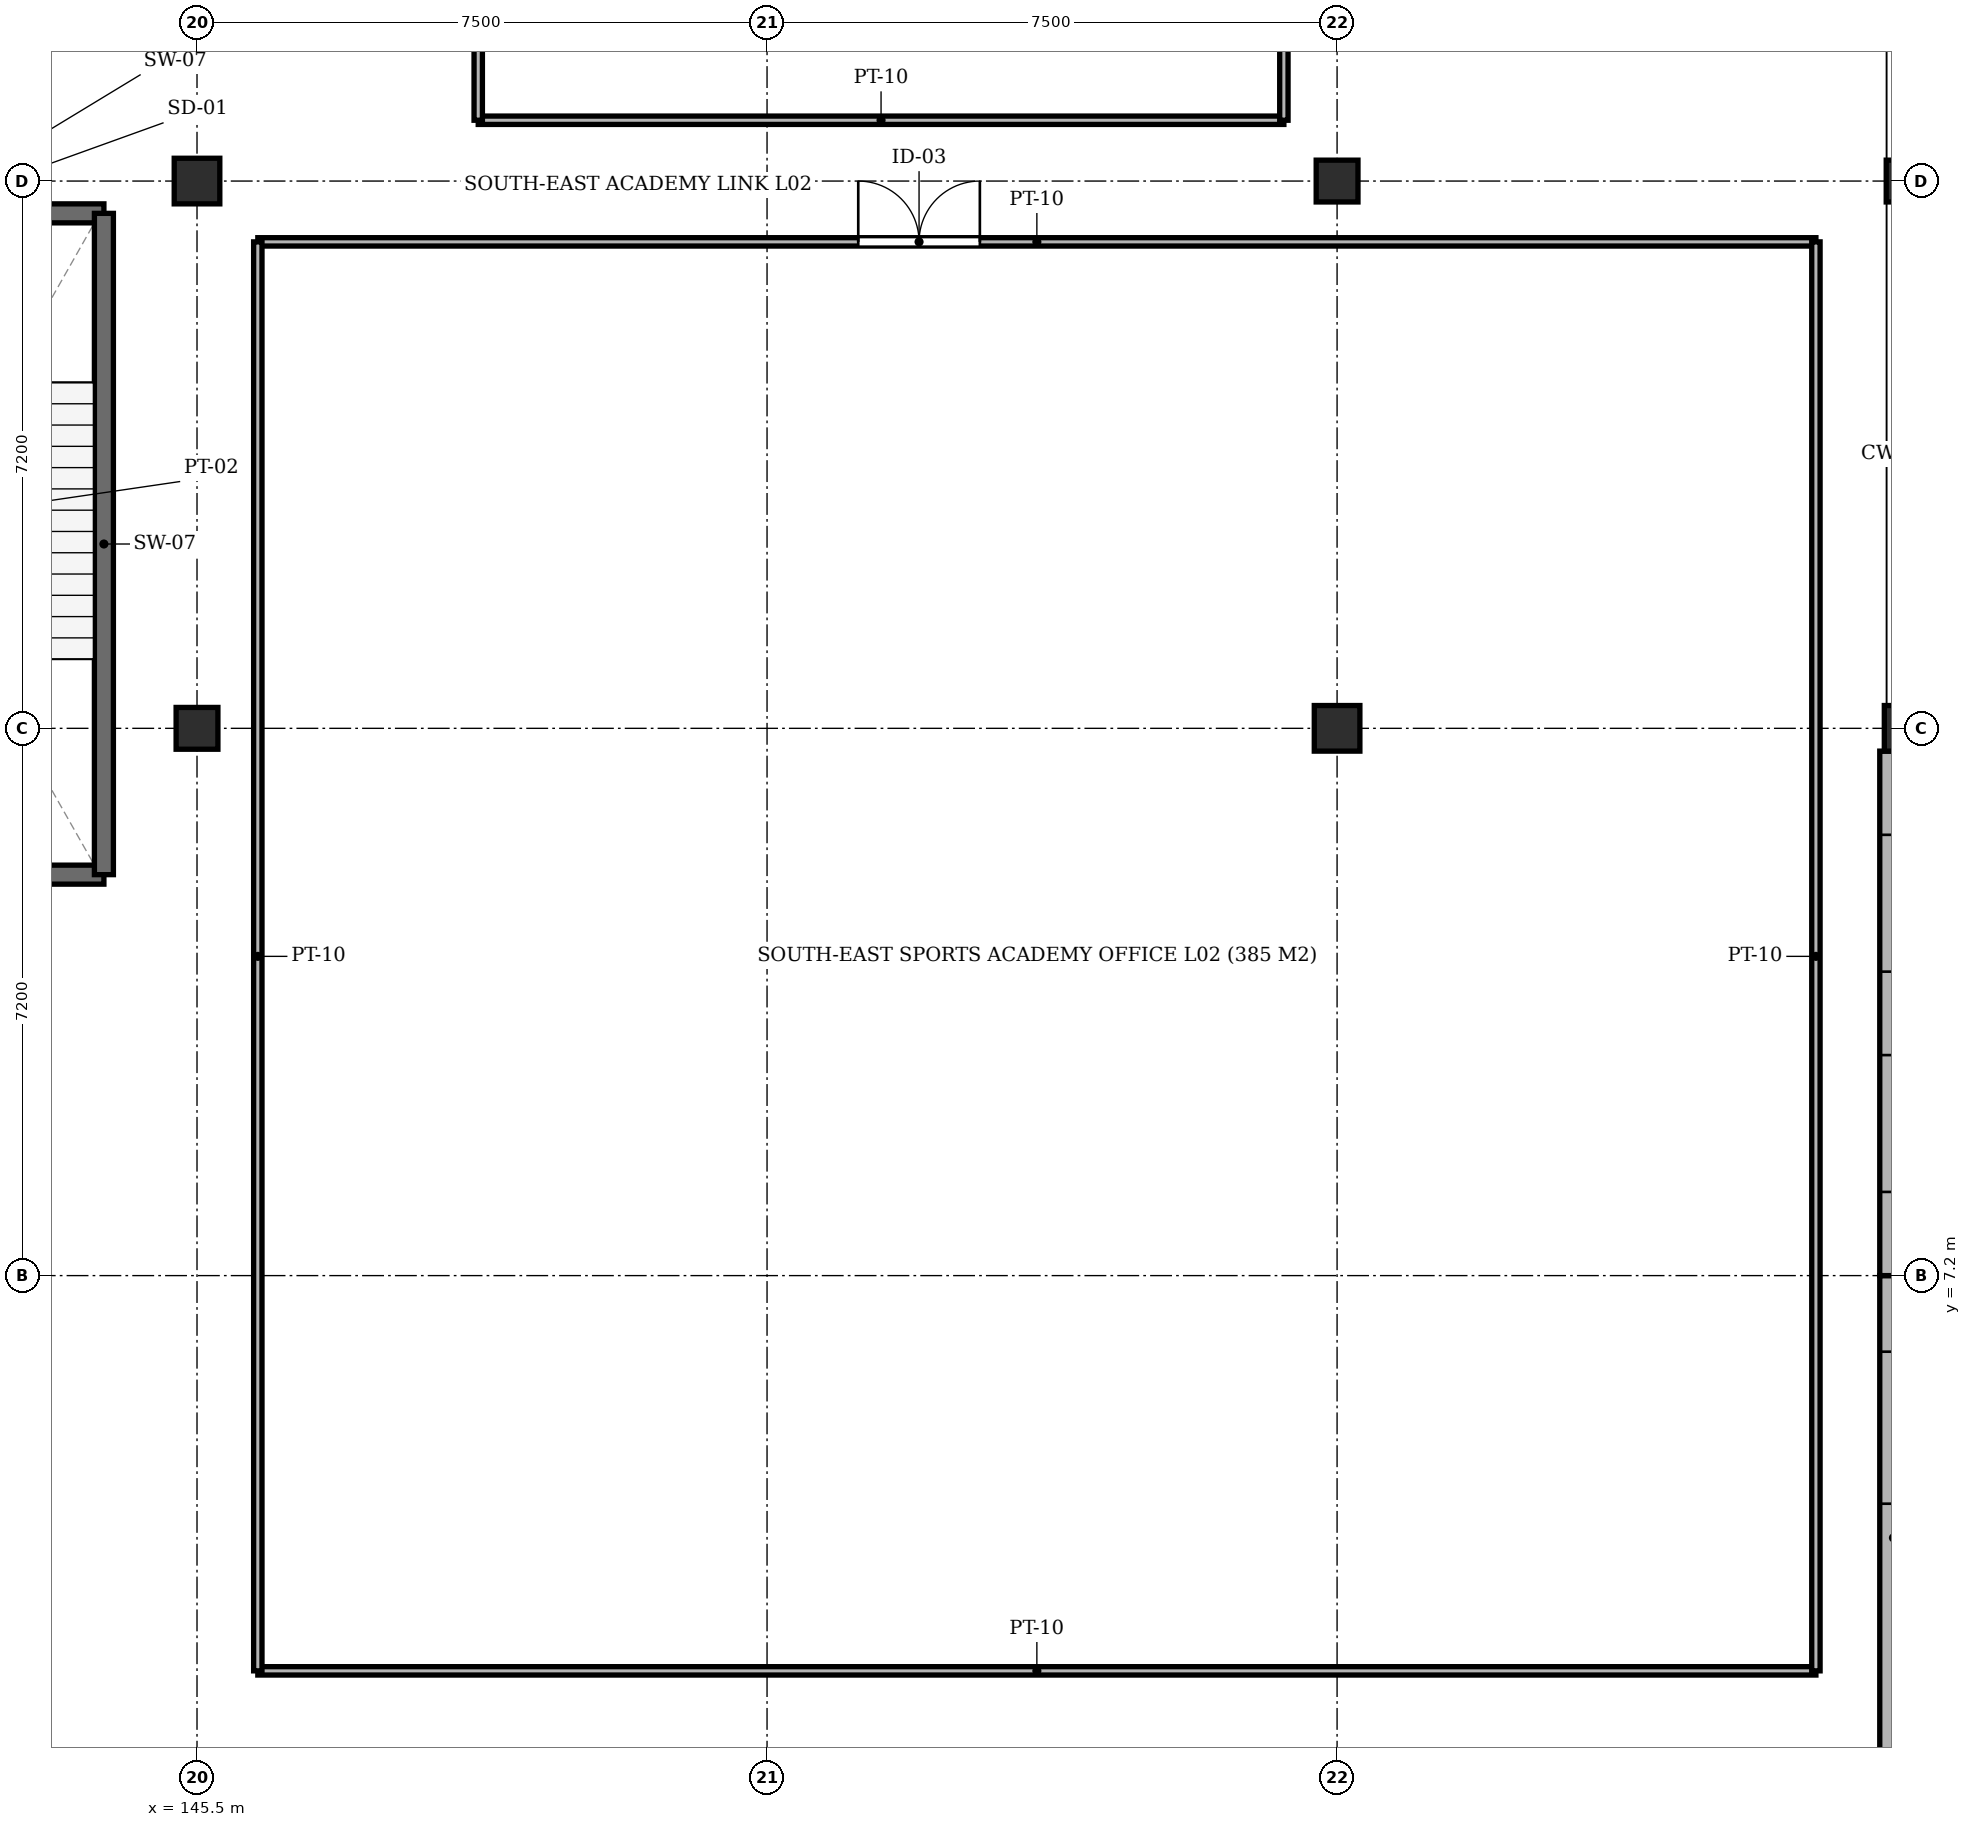
"""IFC4 building model, lengths in metres.
Left out: names, types, materials, properties, quantities, classifications, styles, units other than length and angle.
Written with IfcOpenShell. Run it as: python <this file> out.ifc"""

import sys

from ifc_helpers import new_model, si_unit, direction, frame, frame_2d, origin, origin_2d, place, context, subcontext, project, spatial, rectangle, extrude, element, fill, save


model = new_model("IFC4")
c1 = context("Model", 3, precision=1e-05, world=origin(), true_north=direction((0.0, 1.0)))
c2 = subcontext(c1, "Body", "Model", "MODEL_VIEW")
j1 = project(units=[si_unit("LENGTHUNIT", "METRE"), si_unit("PLANEANGLEUNIT", "RADIAN")], contexts=[c1])
p1 = place(None, origin())
s1 = spatial("IfcSite", under=j1, at=p1, CompositionType="ELEMENT")
p2 = place(p1, origin())
s2 = spatial("IfcBuilding", under=s1, at=p2, CompositionType="ELEMENT")
p3 = place(p2, frame((0.0, 0.0, 9.4)))
s3 = spatial("IfcBuildingStorey", under=s2, at=p3, CompositionType="ELEMENT", Elevation=9.4)
p4 = place(p3, frame((145.5, 14.4, -0.45), z_axis=(0.0, 0.0, 1.0), x_axis=(1.0, 0.0, 0.0)))
e1 = element("IfcColumn", 1, at=p4, inside=s3, PredefinedType="COLUMN", context=c2, shape_type="SweptSolid", body=[
    extrude(rectangle(XDim=0.55, YDim=0.55, at=origin_2d()), origin(), (0.0, 0.0, 1.0), 4.77),
])
for number, where, z_axis, x_axis in (
    (2, (145.5, 21.6, -0.45), (0.0, 0.0, 1.0), (1.0, 0.0, 0.0)),
    (3, (160.5, 14.4, -0.45), (0.0, 0.0, 1.0), (1.0, 0.0, 0.0)),
):
    element("IfcColumn", number, at=place(p3, frame(where, z_axis=z_axis, x_axis=x_axis)), inside=s3, PredefinedType="COLUMN", context=c2, shape_type="SweptSolid", body=[
        extrude(rectangle(XDim=0.6, YDim=0.6, at=origin_2d()), origin(), (0.0, 0.0, 1.0), 4.77),
    ])
p5 = place(p3, frame((160.5, 21.6, -0.45), z_axis=(0.0, 0.0, 1.0), x_axis=(1.0, 0.0, 0.0)))
e4 = element("IfcColumn", 4, at=p5, inside=s3, PredefinedType="COLUMN", context=c2, shape_type="SweptSolid", body=[
    extrude(rectangle(XDim=0.55, YDim=0.55, at=origin_2d()), origin(), (0.0, 0.0, 1.0), 4.77),
])
p6 = place(p3, frame((168.0, 14.4, -0.45), z_axis=(0.0, 0.0, 1.0), x_axis=(1.0, 0.0, 0.0)))
e5 = element("IfcColumn", 5, at=p6, inside=s3, PredefinedType="COLUMN", context=c2, shape_type="SweptSolid", body=[
    extrude(rectangle(XDim=0.6, YDim=0.6, at=origin_2d()), origin(), (0.0, 0.0, 1.0), 4.77),
])
p7 = place(p3, frame((168.0, 21.6, -0.45), z_axis=(0.0, 0.0, 1.0), x_axis=(1.0, 0.0, 0.0)))
e6 = element("IfcColumn", 6, at=p7, inside=s3, PredefinedType="COLUMN", context=c2, shape_type="SweptSolid", body=[
    extrude(rectangle(XDim=0.55, YDim=0.55, at=origin_2d()), origin(), (0.0, 0.0, 1.0), 4.77),
])
p8 = place(p3, frame((167.82, 0.3, 0.0), z_axis=(0.0, 0.0, 1.0), x_axis=(0.0, 1.0, 0.0)))
e7 = element("IfcWall", 7, at=p8, inside=s3, PredefinedType="SOLIDWALL", context=c2, shape_type="SweptSolid", body=[
    extrude(rectangle(XDim=6.9, YDim=0.36, at=frame_2d((3.45, 0.0))), origin(), (0.0, 0.0, 1.0), 3.45),
])
p9 = place(p8, frame((3.899, 0.0, 0.92)))
e8 = element("IfcOpeningElement", 8, at=p9, cuts=e7, PredefinedType="OPENING", context=c2, shape_type="SweptSolid", body=[
    extrude(rectangle(XDim=2.0, YDim=2.1, at=frame_2d((1.0, 1.05))), frame((0.0, 0.192, 0.0), z_axis=(0.0, -1.0, 0.0), x_axis=(1.0, 0.0, 0.0)), (0.0, 0.0, 1.0), 0.384),
])
p10 = place(p3, frame((167.82, 7.2, 0.0), z_axis=(0.0, 0.0, 1.0), x_axis=(0.0, 1.0, 0.0)))
e9 = element("IfcWall", 9, at=p10, inside=s3, PredefinedType="SOLIDWALL", context=c2, shape_type="SweptSolid", body=[
    extrude(rectangle(XDim=6.9, YDim=0.36, at=frame_2d((3.45, 0.0))), origin(), (0.0, 0.0, 1.0), 3.45),
])
p11 = place(p10, frame((1.101, 0.0, 0.92)))
e10 = element("IfcOpeningElement", 10, at=p11, cuts=e9, PredefinedType="OPENING", context=c2, shape_type="SweptSolid", body=[
    extrude(rectangle(XDim=1.8, YDim=2.1, at=frame_2d((0.9, 1.05))), frame((0.0, 0.192, 0.0), z_axis=(0.0, -1.0, 0.0), x_axis=(1.0, 0.0, 0.0)), (0.0, 0.0, 1.0), 0.384),
])
p12 = place(p10, frame((3.999, 0.0, 0.92)))
e11 = element("IfcOpeningElement", 11, at=p12, cuts=e9, PredefinedType="OPENING", context=c2, shape_type="SweptSolid", body=[
    extrude(rectangle(XDim=1.8, YDim=2.1, at=frame_2d((0.9, 1.05))), frame((0.0, 0.192, 0.0), z_axis=(0.0, -1.0, 0.0), x_axis=(1.0, 0.0, 0.0)), (0.0, 0.0, 1.0), 0.384),
])
p13 = place(p3, frame((139.225, 12.475, 0.0), z_axis=(0.0, 0.0, 1.0), x_axis=(1.0, 0.0, 0.0)))
e12 = element("IfcWall", 12, at=p13, inside=s3, PredefinedType="SHEAR", context=c2, shape_type="SweptSolid", body=[
    extrude(rectangle(XDim=5.05, YDim=0.25, at=frame_2d((2.525, 0.0))), origin(), (0.0, 0.0, 1.0), 4.32),
])
p14 = place(p3, frame((144.275, 21.175, 0.0), z_axis=(0.0, 0.0, 1.0), x_axis=(-1.0, 0.0, 0.0)))
e13 = element("IfcWall", 13, at=p14, inside=s3, PredefinedType="SHEAR", context=c2, shape_type="SweptSolid", body=[
    extrude(rectangle(XDim=5.05, YDim=0.25, at=frame_2d((2.525, 0.0))), origin(), (0.0, 0.0, 1.0), 4.32),
])
p15 = place(p14, frame((1.875, 0.0, 0.0)))
e14 = element("IfcOpeningElement", 14, at=p15, cuts=e13, PredefinedType="OPENING", context=c2, shape_type="SweptSolid", body=[
    extrude(rectangle(XDim=1.3, YDim=2.2, at=frame_2d((0.65, 1.1))), frame((0.0, 0.137, 0.0), z_axis=(0.0, -1.0, 0.0), x_axis=(1.0, 0.0, 0.0)), (0.0, 0.0, 1.0), 0.274),
])
p16 = place(p3, frame((144.275, 12.475, 0.0), z_axis=(0.0, 0.0, 1.0), x_axis=(0.0, 1.0, 0.0)))
e15 = element("IfcWall", 15, at=p16, inside=s3, PredefinedType="SHEAR", context=c2, shape_type="SweptSolid", body=[
    extrude(rectangle(XDim=8.7, YDim=0.25, at=frame_2d((4.35, 0.0))), origin(), (0.0, 0.0, 1.0), 4.32),
])
p17 = place(p3, frame((149.2, 22.4, 0.0), z_axis=(0.0, 0.0, 1.0), x_axis=(1.0, 0.0, 0.0)))
e16 = element("IfcWall", 16, at=p17, inside=s3, PredefinedType="PARTITIONING", context=c2, shape_type="SweptSolid", body=[
    extrude(rectangle(XDim=10.6, YDim=0.11, at=frame_2d((5.3, 0.0))), origin(), (0.0, 0.0, 1.0), 3.88),
])
p18 = place(p3, frame((149.2, 22.4, 0.0), z_axis=(0.0, 0.0, 1.0), x_axis=(0.0, 1.0, 0.0)))
e17 = element("IfcWall", 17, at=p18, inside=s3, PredefinedType="PARTITIONING", context=c2, shape_type="SweptSolid", body=[
    extrude(rectangle(XDim=12.4, YDim=0.11, at=frame_2d((6.2, 0.0))), origin(), (0.0, 0.0, 1.0), 3.88),
])
p19 = place(p18, frame((5.65, 0.0, 0.0)))
e18 = element("IfcOpeningElement", 18, at=p19, cuts=e17, PredefinedType="OPENING", context=c2, shape_type="SweptSolid", body=[
    extrude(rectangle(XDim=1.1, YDim=2.15, at=frame_2d((0.55, 1.075))), frame((0.0, 0.067, 0.0), z_axis=(0.0, -1.0, 0.0), x_axis=(1.0, 0.0, 0.0)), (0.0, 0.0, 1.0), 0.134),
])
p20 = place(p3, frame((159.8, 22.4, 0.0), z_axis=(0.0, 0.0, 1.0), x_axis=(0.0, 1.0, 0.0)))
e19 = element("IfcWall", 19, at=p20, inside=s3, PredefinedType="PARTITIONING", context=c2, shape_type="SweptSolid", body=[
    extrude(rectangle(XDim=12.4, YDim=0.11, at=frame_2d((6.2, 0.0))), origin(), (0.0, 0.0, 1.0), 3.88),
])
p21 = place(p3, frame((146.3, 2.0, 0.0), z_axis=(0.0, 0.0, 1.0), x_axis=(1.0, 0.0, 0.0)))
e20 = element("IfcWall", 20, at=p21, inside=s3, PredefinedType="PARTITIONING", context=c2, shape_type="SweptSolid", body=[
    extrude(rectangle(XDim=20.5, YDim=0.11, at=frame_2d((10.25, 0.0))), origin(), (0.0, 0.0, 1.0), 3.88),
])
p22 = place(p3, frame((146.3, 20.8, 0.0), z_axis=(0.0, 0.0, 1.0), x_axis=(1.0, 0.0, 0.0)))
e21 = element("IfcWall", 21, at=p22, inside=s3, PredefinedType="PARTITIONING", context=c2, shape_type="SweptSolid", body=[
    extrude(rectangle(XDim=20.5, YDim=0.11, at=frame_2d((10.25, 0.0))), origin(), (0.0, 0.0, 1.0), 3.88),
])
p23 = place(p22, frame((7.9, 0.0, 0.0)))
e22 = element("IfcOpeningElement", 22, at=p23, cuts=e21, PredefinedType="OPENING", context=c2, shape_type="SweptSolid", body=[
    extrude(rectangle(XDim=1.6, YDim=2.2, at=frame_2d((0.8, 1.1))), frame((0.0, 0.067, 0.0), z_axis=(0.0, -1.0, 0.0), x_axis=(1.0, 0.0, 0.0)), (0.0, 0.0, 1.0), 0.134),
])
for number, where, z_axis, x_axis in (
    (23, (146.3, 2.0, 0.0), (0.0, 0.0, 1.0), (0.0, 1.0, 0.0)),
    (24, (166.8, 2.0, 0.0), (0.0, 0.0, 1.0), (0.0, 1.0, 0.0)),
):
    element("IfcWall", number, at=place(p3, frame(where, z_axis=z_axis, x_axis=x_axis)), inside=s3, PredefinedType="PARTITIONING", context=c2, shape_type="SweptSolid", body=[
        extrude(rectangle(XDim=18.8, YDim=0.11, at=frame_2d((9.4, 0.0))), origin(), (0.0, 0.0, 1.0), 3.88),
    ])
p24 = place(p9, origin())
e25 = element("IfcWindow", 25, at=p24, inside=s3, PartitioningType="SINGLE_PANEL", PredefinedType="WINDOW", context=c2, shape_type="SweptSolid", body=[
    extrude(rectangle(XDim=2.0, YDim=2.1, at=frame_2d((1.0, 1.05))), frame((0.0, 0.03, 0.0), z_axis=(0.0, -1.0, 0.0), x_axis=(1.0, 0.0, 0.0)), (0.0, 0.0, 1.0), 0.06),
])
fill(e8, e25)
p25 = place(p11, origin())
e26 = element("IfcWindow", 26, at=p25, inside=s3, PartitioningType="SINGLE_PANEL", PredefinedType="WINDOW", context=c2, shape_type="SweptSolid", body=[
    extrude(rectangle(XDim=1.8, YDim=2.1, at=frame_2d((0.9, 1.05))), frame((0.0, 0.03, 0.0), z_axis=(0.0, -1.0, 0.0), x_axis=(1.0, 0.0, 0.0)), (0.0, 0.0, 1.0), 0.06),
])
fill(e10, e26)
p26 = place(p12, origin())
e27 = element("IfcWindow", 27, at=p26, inside=s3, PartitioningType="SINGLE_PANEL", PredefinedType="WINDOW", context=c2, shape_type="SweptSolid", body=[
    extrude(rectangle(XDim=1.8, YDim=2.1, at=frame_2d((0.9, 1.05))), frame((0.0, 0.03, 0.0), z_axis=(0.0, -1.0, 0.0), x_axis=(1.0, 0.0, 0.0)), (0.0, 0.0, 1.0), 0.06),
])
fill(e11, e27)
p27 = place(p23, origin())
e28 = element("IfcDoor", 28, at=p27, inside=s3, OperationType="DOUBLE_DOOR_SINGLE_SWING", PredefinedType="DOOR", context=c2, shape_type="SweptSolid", body=[
    extrude(rectangle(XDim=1.6, YDim=2.2, at=frame_2d((0.8, 1.1))), frame((0.0, 0.025, 0.0), z_axis=(0.0, -1.0, 0.0), x_axis=(1.0, 0.0, 0.0)), (0.0, 0.0, 1.0), 0.05),
])
fill(e22, e28)
save(model, sys.argv[1])
